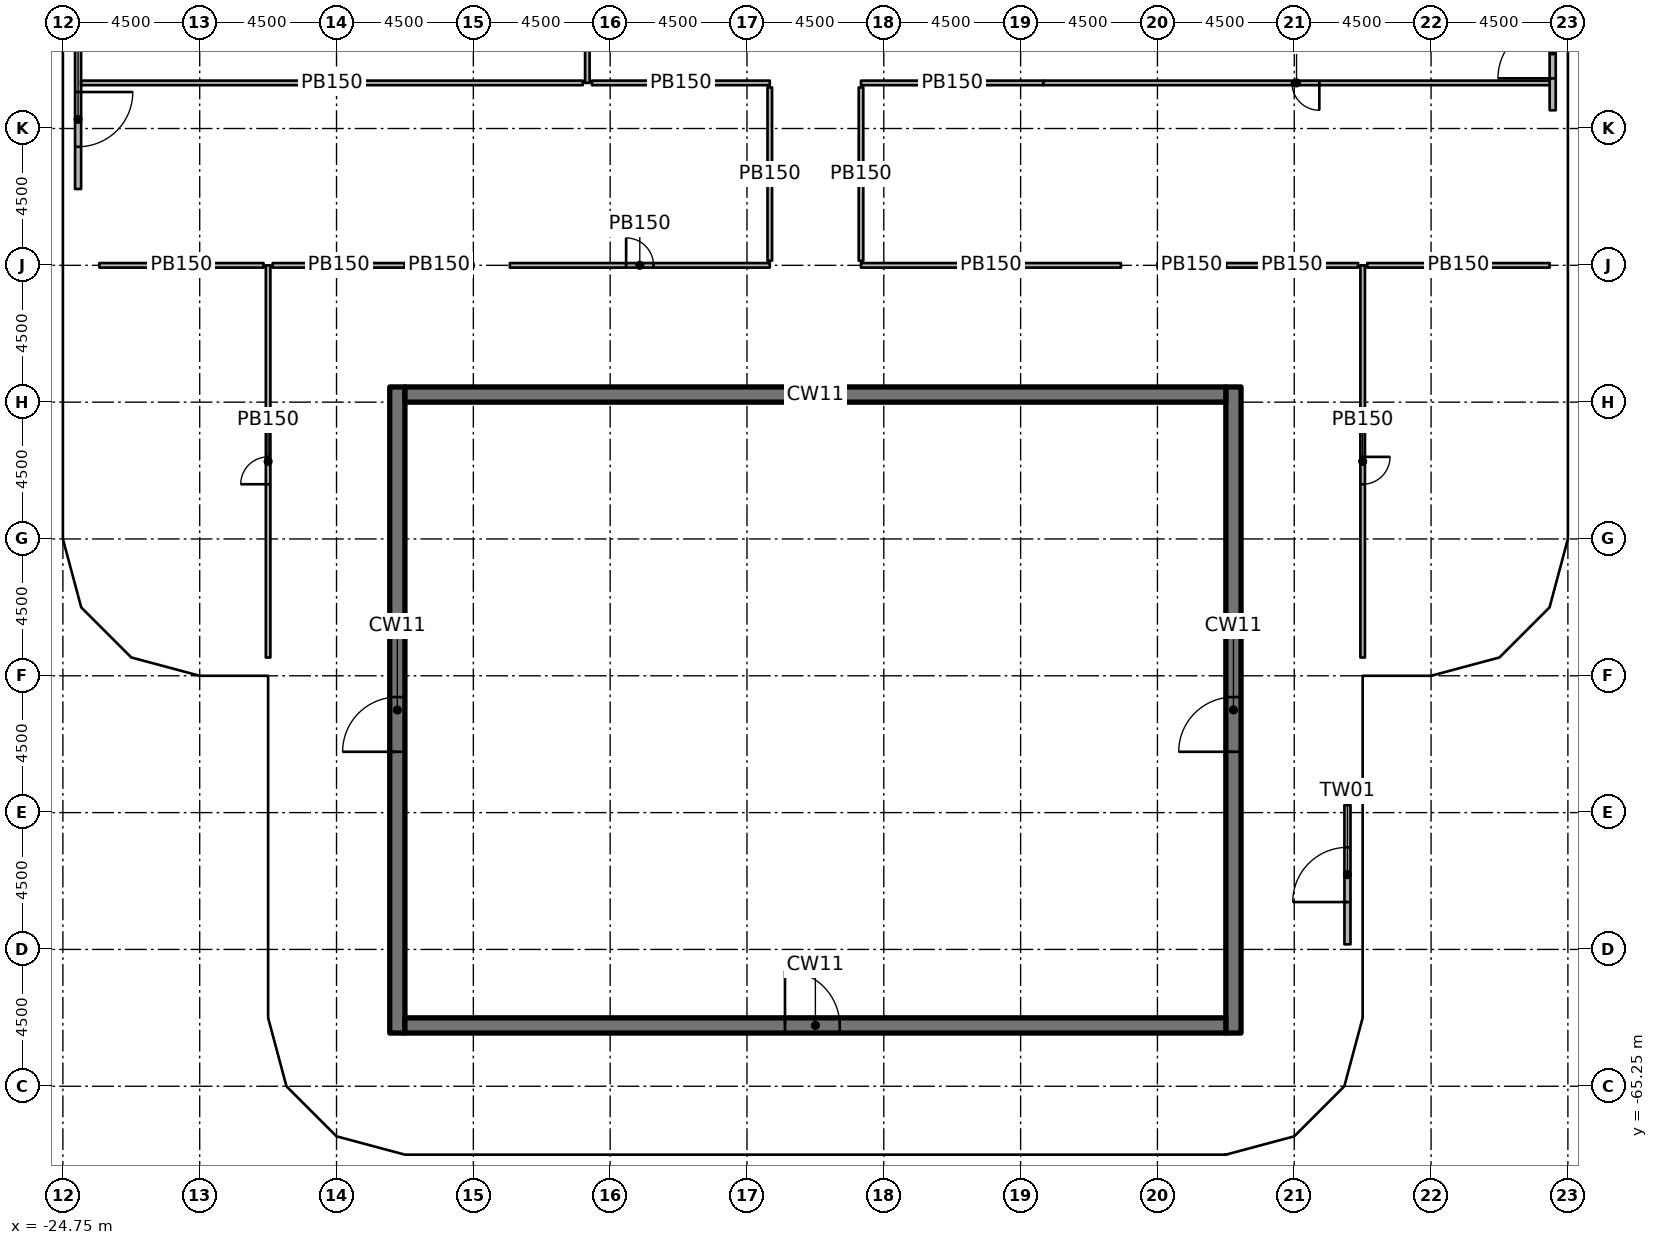
"""IFC4 building model, lengths in metres.
Left out: names, types, materials, properties, quantities, classifications, styles, units other than length and angle.
Written with IfcOpenShell. Run it as: python <this file> out.ifc"""

import sys

from ifc_helpers import new_model, si_unit, direction, frame, frame_2d, origin, origin_2d, place, context, subcontext, project, spatial, rectangle, extrude, element, fill, save


model = new_model("IFC4")
c1 = context("Model", 3, precision=1e-05, world=origin(), true_north=direction((0.0, 1.0)))
c2 = subcontext(c1, "Body", "Model", "MODEL_VIEW")
j1 = project(units=[si_unit("LENGTHUNIT", "METRE"), si_unit("PLANEANGLEUNIT", "RADIAN")], contexts=[c1])
p1 = place(None, origin())
s1 = spatial("IfcSite", under=j1, at=p1, CompositionType="ELEMENT")
p2 = place(p1, origin())
s2 = spatial("IfcBuilding", under=s1, at=p2, CompositionType="ELEMENT")
p3 = place(p2, frame((0.0, 0.0, 7.0)))
s3 = spatial("IfcBuildingStorey", under=s2, at=p3, CompositionType="ELEMENT", Elevation=7.0)
for number, where, z_axis, x_axis in (
    (1, (-24.15, -38.25, 0.0), (0.0, 0.0, 1.0), (1.0, 0.0, 0.0)),
    (2, (-19.65, -42.75, 0.0), (0.0, 0.0, 1.0), (1.0, 0.0, 0.0)),
    (3, (-15.75, -60.75, 0.0), (0.0, 0.0, 1.0), (1.0, 0.0, 0.0)),
    (4, (-15.75, -56.25, 0.0), (0.0, 0.0, 1.0), (1.0, 0.0, 0.0)),
    (5, (-15.75, -51.75, 0.0), (0.0, 0.0, 1.0), (1.0, 0.0, 0.0)),
    (6, (-15.75, -47.25, 0.0), (0.0, 0.0, 1.0), (1.0, 0.0, 0.0)),
    (7, (-15.75, -42.75, 0.0), (0.0, 0.0, 1.0), (1.0, 0.0, 0.0)),
    (8, (-15.367, -39.68, 0.0), (0.0, 0.0, 1.0), (1.0, 0.0, 0.0)),
    (9, (-15.15, -33.75, 0.0), (0.0, 0.0, 1.0), (1.0, 0.0, 0.0)),
    (10, (-11.25, -65.25, 0.0), (0.0, 0.0, 1.0), (1.0, 0.0, 0.0)),
    (11, (-10.65, -38.85, 0.0), (0.0, 0.0, 1.0), (1.0, 0.0, 0.0)),
    (12, (-6.75, -65.25, 0.0), (0.0, 0.0, 1.0), (1.0, 0.0, 0.0)),
    (13, (-2.25, -65.25, 0.0), (0.0, 0.0, 1.0), (1.0, 0.0, 0.0)),
    (14, (-2.25, -33.11, 0.0), (0.0, 0.0, 1.0), (1.0, 0.0, 0.0)),
    (15, (2.25, -65.25, 0.0), (0.0, 0.0, 1.0), (1.0, 0.0, 0.0)),
    (16, (2.25, -33.11, 0.0), (0.0, 0.0, 1.0), (1.0, 0.0, 0.0)),
    (17, (6.75, -65.25, 0.0), (0.0, 0.0, 1.0), (1.0, 0.0, 0.0)),
    (18, (11.25, -65.25, 0.0), (0.0, 0.0, 1.0), (1.0, 0.0, 0.0)),
    (19, (10.65, -38.85, 0.0), (0.0, 0.0, 1.0), (1.0, 0.0, 0.0)),
    (20, (10.65, -33.75, 0.0), (0.0, 0.0, 1.0), (1.0, 0.0, 0.0)),
    (21, (15.75, -60.75, 0.0), (0.0, 0.0, 1.0), (1.0, 0.0, 0.0)),
    (22, (15.75, -56.25, 0.0), (0.0, 0.0, 1.0), (1.0, 0.0, 0.0)),
    (23, (15.75, -51.75, 0.0), (0.0, 0.0, 1.0), (1.0, 0.0, 0.0)),
    (24, (15.75, -47.25, 0.0), (0.0, 0.0, 1.0), (1.0, 0.0, 0.0)),
    (25, (15.75, -42.75, 0.0), (0.0, 0.0, 1.0), (1.0, 0.0, 0.0)),
    (26, (15.367, -39.68, 0.0), (0.0, 0.0, 1.0), (1.0, 0.0, 0.0)),
    (27, (19.65, -42.75, 0.0), (0.0, 0.0, 1.0), (1.0, 0.0, 0.0)),
    (28, (23.97, -47.25, 0.0), (0.0, 0.0, 1.0), (1.0, 0.0, 0.0)),
    (29, (24.15, -33.75, 0.0), (0.0, 0.0, 1.0), (1.0, 0.0, 0.0)),
):
    element("IfcColumn", number, at=place(p3, frame(where, z_axis=z_axis, x_axis=x_axis)), inside=s3, PredefinedType="COLUMN", context=c2, shape_type="SweptSolid", body=[
        extrude(rectangle(XDim=1.2, YDim=1.2, at=origin_2d()), origin(), (0.0, 0.0, 1.0), 4.55),
    ])
p4 = place(p3, frame((-13.75, -63.5, 0.0), z_axis=(0.0, 0.0, 1.0), x_axis=(0.0, 1.0, 0.0)))
e30 = element("IfcWall", 30, at=p4, inside=s3, PredefinedType="SOLIDWALL", context=c2, shape_type="SweptSolid", body=[
    extrude(rectangle(XDim=21.25, YDim=0.5, at=frame_2d((10.625, 0.0))), origin(), (0.0, 0.0, 1.0), 5.0),
])
p5 = place(p4, frame((9.25, 0.0, 0.0)))
e31 = element("IfcOpeningElement", 31, at=p5, cuts=e30, PredefinedType="OPENING", context=c2, shape_type="SweptSolid", body=[
    extrude(rectangle(XDim=1.8, YDim=2.1, at=frame_2d((0.9, 1.05))), frame((0.0, 0.26, 0.0), z_axis=(0.0, -1.0, 0.0), x_axis=(1.0, 0.0, 0.0)), (0.0, 0.0, 1.0), 0.52),
])
p6 = place(p3, frame((13.75, -63.5, 0.0), z_axis=(0.0, 0.0, 1.0), x_axis=(0.0, 1.0, 0.0)))
e32 = element("IfcWall", 32, at=p6, inside=s3, PredefinedType="SOLIDWALL", context=c2, shape_type="SweptSolid", body=[
    extrude(rectangle(XDim=21.25, YDim=0.5, at=frame_2d((10.625, 0.0))), origin(), (0.0, 0.0, 1.0), 5.0),
])
p7 = place(p6, frame((9.25, 0.0, 0.0)))
e33 = element("IfcOpeningElement", 33, at=p7, cuts=e32, PredefinedType="OPENING", context=c2, shape_type="SweptSolid", body=[
    extrude(rectangle(XDim=1.8, YDim=2.1, at=frame_2d((0.9, 1.05))), frame((0.0, 0.26, 0.0), z_axis=(0.0, -1.0, 0.0), x_axis=(1.0, 0.0, 0.0)), (0.0, 0.0, 1.0), 0.52),
])
p8 = place(p3, frame((-13.5, -63.25, 0.0), z_axis=(0.0, 0.0, 1.0), x_axis=(1.0, 0.0, 0.0)))
e34 = element("IfcWall", 34, at=p8, inside=s3, PredefinedType="SOLIDWALL", context=c2, shape_type="SweptSolid", body=[
    extrude(rectangle(XDim=27.0, YDim=0.5, at=frame_2d((13.5, 0.0))), origin(), (0.0, 0.0, 1.0), 5.0),
])
p9 = place(p8, frame((12.5, 0.0, 0.0)))
e35 = element("IfcOpeningElement", 35, at=p9, cuts=e34, PredefinedType="OPENING", context=c2, shape_type="SweptSolid", body=[
    extrude(rectangle(XDim=1.8, YDim=2.1, at=frame_2d((0.9, 1.05))), frame((0.0, 0.26, 0.0), z_axis=(0.0, -1.0, 0.0), x_axis=(1.0, 0.0, 0.0)), (0.0, 0.0, 1.0), 0.52),
])
p10 = place(p3, frame((-13.5, -42.5, 0.0), z_axis=(0.0, 0.0, 1.0), x_axis=(1.0, 0.0, 0.0)))
e36 = element("IfcWall", 36, at=p10, inside=s3, PredefinedType="SOLIDWALL", context=c2, shape_type="SweptSolid", body=[
    extrude(rectangle(XDim=27.0, YDim=0.5, at=frame_2d((13.5, 0.0))), origin(), (0.0, 0.0, 1.0), 5.0),
])
p11 = place(p3, frame((17.5, -60.582, 0.0), z_axis=(0.0, 0.0, 1.0), x_axis=(0.0, 1.0, 0.0)))
e37 = element("IfcWall", 37, at=p11, inside=s3, PredefinedType="SOLIDWALL", context=c2, shape_type="SweptSolid", body=[
    extrude(rectangle(XDim=4.58, YDim=0.2, at=frame_2d((2.29, 0.0))), origin(), (0.0, 0.0, 1.0), 4.55),
])
p12 = place(p11, frame((1.39, 0.0, 0.0)))
e38 = element("IfcOpeningElement", 38, at=p12, cuts=e37, PredefinedType="OPENING", context=c2, shape_type="SweptSolid", body=[
    extrude(rectangle(XDim=1.8, YDim=2.4, at=frame_2d((0.9, 1.2))), frame((0.0, 0.11, 0.0), z_axis=(0.0, -1.0, 0.0), x_axis=(1.0, 0.0, 0.0)), (0.0, 0.0, 1.0), 0.22),
])
p13 = place(p3, frame((24.25, -33.15, 0.0), z_axis=(0.0, 0.0, 1.0), x_axis=(0.0, 1.0, 0.0)))
e39 = element("IfcWall", 39, at=p13, inside=s3, PredefinedType="SOLIDWALL", context=c2, shape_type="SweptSolid", body=[
    extrude(rectangle(XDim=3.9, YDim=0.2, at=frame_2d((1.95, 0.0))), origin(), (0.0, 0.0, 1.0), 4.55),
])
p14 = place(p13, frame((1.05, 0.0, 0.0)))
e40 = element("IfcOpeningElement", 40, at=p14, cuts=e39, PredefinedType="OPENING", context=c2, shape_type="SweptSolid", body=[
    extrude(rectangle(XDim=1.8, YDim=2.4, at=frame_2d((0.9, 1.2))), frame((0.0, 0.11, 0.0), z_axis=(0.0, -1.0, 0.0), x_axis=(1.0, 0.0, 0.0)), (0.0, 0.0, 1.0), 0.22),
])
p15 = place(p3, frame((-24.25, -31.16, 0.0), z_axis=(0.0, 0.0, 1.0), x_axis=(0.0, -1.0, 0.0)))
e41 = element("IfcWall", 41, at=p15, inside=s3, PredefinedType="SOLIDWALL", context=c2, shape_type="SweptSolid", body=[
    extrude(rectangle(XDim=4.58, YDim=0.2, at=frame_2d((2.29, 0.0))), origin(), (0.0, 0.0, 1.0), 4.55),
])
p16 = place(p15, frame((1.39, 0.0, 0.0)))
e42 = element("IfcOpeningElement", 42, at=p16, cuts=e41, PredefinedType="OPENING", context=c2, shape_type="SweptSolid", body=[
    extrude(rectangle(XDim=1.8, YDim=2.4, at=frame_2d((0.9, 1.2))), frame((0.0, 0.11, 0.0), z_axis=(0.0, -1.0, 0.0), x_axis=(1.0, 0.0, 0.0)), (0.0, 0.0, 1.0), 0.22),
])
p17 = place(p3, frame((-18.0, -51.15, 0.0), z_axis=(0.0, 0.0, 1.0), x_axis=(0.0, 1.0, 0.0)))
e43 = element("IfcWall", 43, at=p17, inside=s3, PredefinedType="PARTITIONING", context=c2, shape_type="SweptSolid", body=[
    extrude(rectangle(XDim=12.9, YDim=0.15, at=frame_2d((6.45, 0.0))), origin(), (0.0, 0.0, 1.0), 4.55),
])
p18 = place(p17, frame((5.7, 0.0, 0.0)))
e44 = element("IfcOpeningElement", 44, at=p18, cuts=e43, PredefinedType="OPENING", context=c2, shape_type="SweptSolid", body=[
    extrude(rectangle(XDim=0.9, YDim=2.1, at=frame_2d((0.45, 1.05))), frame((0.0, 0.085, 0.0), z_axis=(0.0, -1.0, 0.0), x_axis=(1.0, 0.0, 0.0)), (0.0, 0.0, 1.0), 0.17),
])
p19 = place(p3, frame((18.0, -38.25, 0.0), z_axis=(0.0, 0.0, 1.0), x_axis=(0.0, -1.0, 0.0)))
e45 = element("IfcWall", 45, at=p19, inside=s3, PredefinedType="PARTITIONING", context=c2, shape_type="SweptSolid", body=[
    extrude(rectangle(XDim=12.9, YDim=0.15, at=frame_2d((6.45, 0.0))), origin(), (0.0, 0.0, 1.0), 4.55),
])
p20 = place(p19, frame((6.3, 0.0, 0.0)))
e46 = element("IfcOpeningElement", 46, at=p20, cuts=e45, PredefinedType="OPENING", context=c2, shape_type="SweptSolid", body=[
    extrude(rectangle(XDim=0.9, YDim=2.1, at=frame_2d((0.45, 1.05))), frame((0.0, 0.085, 0.0), z_axis=(0.0, -1.0, 0.0), x_axis=(1.0, 0.0, 0.0)), (0.0, 0.0, 1.0), 0.17),
])
for number, where, z_axis, x_axis in (
    (47, (13.5, -38.25, 0.0), (0.0, 0.0, 1.0), (1.0, 0.0, 0.0)),
    (48, (-17.85, -38.25, 0.0), (0.0, 0.0, 1.0), (1.0, 0.0, 0.0)),
):
    element("IfcWall", number, at=place(p3, frame(where, z_axis=z_axis, x_axis=x_axis)), inside=s3, PredefinedType="PARTITIONING", context=c2, shape_type="SweptSolid", body=[
        extrude(rectangle(XDim=4.35, YDim=0.15, at=frame_2d((2.175, 0.0))), origin(), (0.0, 0.0, 1.0), 4.55),
    ])
p21 = place(p3, frame((1.5, -38.25, 0.0), z_axis=(0.0, 0.0, 1.0), x_axis=(1.0, 0.0, 0.0)))
e49 = element("IfcWall", 49, at=p21, inside=s3, PredefinedType="PARTITIONING", context=c2, shape_type="SweptSolid", body=[
    extrude(rectangle(XDim=8.55, YDim=0.15, at=frame_2d((4.275, 0.0))), origin(), (0.0, 0.0, 1.0), 4.55),
])
for number, where, z_axis, x_axis in (
    (50, (11.25, -38.25, 0.0), (0.0, 0.0, 1.0), (1.0, 0.0, 0.0)),
    (51, (-13.5, -38.25, 0.0), (0.0, 0.0, 1.0), (1.0, 0.0, 0.0)),
):
    element("IfcWall", number, at=place(p3, frame(where, z_axis=z_axis, x_axis=x_axis)), inside=s3, PredefinedType="PARTITIONING", context=c2, shape_type="SweptSolid", body=[
        extrude(rectangle(XDim=2.25, YDim=0.15, at=frame_2d((1.125, 0.0))), origin(), (0.0, 0.0, 1.0), 4.55),
    ])
p22 = place(p3, frame((-10.05, -38.25, 0.0), z_axis=(0.0, 0.0, 1.0), x_axis=(1.0, 0.0, 0.0)))
e52 = element("IfcWall", 52, at=p22, inside=s3, PredefinedType="PARTITIONING", context=c2, shape_type="SweptSolid", body=[
    extrude(rectangle(XDim=8.55, YDim=0.15, at=frame_2d((4.275, 0.0))), origin(), (0.0, 0.0, 1.0), 4.55),
])
p23 = place(p22, frame((3.825, 0.0, 0.0)))
e53 = element("IfcOpeningElement", 53, at=p23, cuts=e52, PredefinedType="OPENING", context=c2, shape_type="SweptSolid", body=[
    extrude(rectangle(XDim=0.9, YDim=2.1, at=frame_2d((0.45, 1.05))), frame((0.0, 0.085, 0.0), z_axis=(0.0, -1.0, 0.0), x_axis=(1.0, 0.0, 0.0)), (0.0, 0.0, 1.0), 0.17),
])
p24 = place(p3, frame((-23.55, -38.25, 0.0), z_axis=(0.0, 0.0, 1.0), x_axis=(1.0, 0.0, 0.0)))
e54 = element("IfcWall", 54, at=p24, inside=s3, PredefinedType="PARTITIONING", context=c2, shape_type="SweptSolid", body=[
    extrude(rectangle(XDim=5.4, YDim=0.15, at=frame_2d((2.7, 0.0))), origin(), (0.0, 0.0, 1.0), 4.55),
])
for number, where, z_axis, x_axis in (
    (55, (18.15, -38.25, 0.0), (0.0, 0.0, 1.0), (1.0, 0.0, 0.0)),
    (56, (7.5, -32.25, 0.0), (0.0, 0.0, 1.0), (-1.0, 0.0, 0.0)),
):
    element("IfcWall", number, at=place(p3, frame(where, z_axis=z_axis, x_axis=x_axis)), inside=s3, PredefinedType="PARTITIONING", context=c2, shape_type="SweptSolid", body=[
        extrude(rectangle(XDim=6.0, YDim=0.15, at=frame_2d((3.0, 0.0))), origin(), (0.0, 0.0, 1.0), 4.55),
    ])
p25 = place(p3, frame((-7.5, -32.25, 0.0), z_axis=(0.0, 0.0, 1.0), x_axis=(0.0, 1.0, 0.0)))
e57 = element("IfcWall", 57, at=p25, inside=s3, PredefinedType="PARTITIONING", context=c2, shape_type="SweptSolid", body=[
    extrude(rectangle(XDim=24.0, YDim=0.15, at=frame_2d((12.0, 0.0))), origin(), (0.0, 0.0, 1.0), 4.55),
])
p26 = place(p25, frame((12.75, 0.0, 0.0)))
e58 = element("IfcOpeningElement", 58, at=p26, cuts=e57, PredefinedType="OPENING", context=c2, shape_type="SweptSolid", body=[
    extrude(rectangle(XDim=0.9, YDim=2.1, at=frame_2d((0.45, 1.05))), frame((0.0, 0.085, 0.0), z_axis=(0.0, -1.0, 0.0), x_axis=(1.0, 0.0, 0.0)), (0.0, 0.0, 1.0), 0.17),
])
p27 = place(p3, frame((-1.5, -32.25, 0.0), z_axis=(0.0, 0.0, 1.0), x_axis=(-1.0, 0.0, 0.0)))
e59 = element("IfcWall", 59, at=p27, inside=s3, PredefinedType="PARTITIONING", context=c2, shape_type="SweptSolid", body=[
    extrude(rectangle(XDim=5.85, YDim=0.15, at=frame_2d((2.925, 0.0))), origin(), (0.0, 0.0, 1.0), 4.55),
])
for number, where, z_axis, x_axis in (
    (60, (1.5, -32.4, 0.0), (0.0, 0.0, 1.0), (0.0, -1.0, 0.0)),
    (61, (-1.5, -38.1, 0.0), (0.0, 0.0, 1.0), (0.0, 1.0, 0.0)),
):
    element("IfcWall", number, at=place(p3, frame(where, z_axis=z_axis, x_axis=x_axis)), inside=s3, PredefinedType="PARTITIONING", context=c2, shape_type="SweptSolid", body=[
        extrude(rectangle(XDim=5.7, YDim=0.15, at=frame_2d((2.85, 0.0))), origin(), (0.0, 0.0, 1.0), 4.55),
    ])
p28 = place(p3, frame((24.15, -32.25, 0.0), z_axis=(0.0, 0.0, 1.0), x_axis=(-1.0, 0.0, 0.0)))
e62 = element("IfcWall", 62, at=p28, inside=s3, PredefinedType="PARTITIONING", context=c2, shape_type="SweptSolid", body=[
    extrude(rectangle(XDim=16.65, YDim=0.15, at=frame_2d((8.325, 0.0))), origin(), (0.0, 0.0, 1.0), 4.55),
])
p29 = place(p28, frame((7.575, 0.0, 0.0)))
e63 = element("IfcOpeningElement", 63, at=p29, cuts=e62, PredefinedType="OPENING", context=c2, shape_type="SweptSolid", body=[
    extrude(rectangle(XDim=0.9, YDim=2.1, at=frame_2d((0.45, 1.05))), frame((0.0, 0.085, 0.0), z_axis=(0.0, -1.0, 0.0), x_axis=(1.0, 0.0, 0.0)), (0.0, 0.0, 1.0), 0.17),
])
p30 = place(p3, frame((-7.65, -32.25, 0.0), z_axis=(0.0, 0.0, 1.0), x_axis=(-1.0, 0.0, 0.0)))
e64 = element("IfcWall", 64, at=p30, inside=s3, PredefinedType="PARTITIONING", context=c2, shape_type="SweptSolid", body=[
    extrude(rectangle(XDim=16.5, YDim=0.15, at=frame_2d((8.25, 0.0))), origin(), (0.0, 0.0, 1.0), 4.55),
])
p31 = place(p12, origin())
e65 = element("IfcDoor", 65, at=p31, inside=s3, OperationType="SINGLE_SWING_LEFT", PredefinedType="DOOR", context=c2, shape_type="SweptSolid", body=[
    extrude(rectangle(XDim=1.8, YDim=2.4, at=frame_2d((0.9, 1.2))), frame((0.0, 0.025, 0.0), z_axis=(0.0, -1.0, 0.0), x_axis=(1.0, 0.0, 0.0)), (0.0, 0.0, 1.0), 0.05),
])
fill(e38, e65)
p32 = place(p14, origin())
e66 = element("IfcDoor", 66, at=p32, inside=s3, OperationType="SINGLE_SWING_LEFT", PredefinedType="DOOR", context=c2, shape_type="SweptSolid", body=[
    extrude(rectangle(XDim=1.8, YDim=2.4, at=frame_2d((0.9, 1.2))), frame((0.0, 0.025, 0.0), z_axis=(0.0, -1.0, 0.0), x_axis=(1.0, 0.0, 0.0)), (0.0, 0.0, 1.0), 0.05),
])
fill(e40, e66)
p33 = place(p16, origin())
e67 = element("IfcDoor", 67, at=p33, inside=s3, OperationType="SINGLE_SWING_LEFT", PredefinedType="DOOR", context=c2, shape_type="SweptSolid", body=[
    extrude(rectangle(XDim=1.8, YDim=2.4, at=frame_2d((0.9, 1.2))), frame((0.0, 0.025, 0.0), z_axis=(0.0, -1.0, 0.0), x_axis=(1.0, 0.0, 0.0)), (0.0, 0.0, 1.0), 0.05),
])
fill(e42, e67)
p34 = place(p18, origin())
e68 = element("IfcDoor", 68, at=p34, inside=s3, OperationType="SINGLE_SWING_LEFT", PredefinedType="DOOR", context=c2, shape_type="SweptSolid", body=[
    extrude(rectangle(XDim=0.9, YDim=2.1, at=frame_2d((0.45, 1.05))), frame((0.0, 0.025, 0.0), z_axis=(0.0, -1.0, 0.0), x_axis=(1.0, 0.0, 0.0)), (0.0, 0.0, 1.0), 0.05),
])
fill(e44, e68)
p35 = place(p20, origin())
e69 = element("IfcDoor", 69, at=p35, inside=s3, OperationType="SINGLE_SWING_LEFT", PredefinedType="DOOR", context=c2, shape_type="SweptSolid", body=[
    extrude(rectangle(XDim=0.9, YDim=2.1, at=frame_2d((0.45, 1.05))), frame((0.0, 0.025, 0.0), z_axis=(0.0, -1.0, 0.0), x_axis=(1.0, 0.0, 0.0)), (0.0, 0.0, 1.0), 0.05),
])
fill(e46, e69)
p36 = place(p23, origin())
e70 = element("IfcDoor", 70, at=p36, inside=s3, OperationType="SINGLE_SWING_LEFT", PredefinedType="DOOR", context=c2, shape_type="SweptSolid", body=[
    extrude(rectangle(XDim=0.9, YDim=2.1, at=frame_2d((0.45, 1.05))), frame((0.0, 0.025, 0.0), z_axis=(0.0, -1.0, 0.0), x_axis=(1.0, 0.0, 0.0)), (0.0, 0.0, 1.0), 0.05),
])
fill(e53, e70)
p37 = place(p29, origin())
e71 = element("IfcDoor", 71, at=p37, inside=s3, OperationType="SINGLE_SWING_LEFT", PredefinedType="DOOR", context=c2, shape_type="SweptSolid", body=[
    extrude(rectangle(XDim=0.9, YDim=2.1, at=frame_2d((0.45, 1.05))), frame((0.0, 0.025, 0.0), z_axis=(0.0, -1.0, 0.0), x_axis=(1.0, 0.0, 0.0)), (0.0, 0.0, 1.0), 0.05),
])
fill(e63, e71)
p38 = place(p5, origin())
e72 = element("IfcDoor", 72, at=p38, inside=s3, OperationType="DOUBLE_DOOR_DOUBLE_SWING", PredefinedType="DOOR", context=c2, shape_type="SweptSolid", body=[
    extrude(rectangle(XDim=1.8, YDim=2.1, at=frame_2d((0.9, 1.05))), frame((0.0, 0.025, 0.0), z_axis=(0.0, -1.0, 0.0), x_axis=(1.0, 0.0, 0.0)), (0.0, 0.0, 1.0), 0.05),
])
fill(e31, e72)
p39 = place(p7, origin())
e73 = element("IfcDoor", 73, at=p39, inside=s3, OperationType="DOUBLE_DOOR_DOUBLE_SWING", PredefinedType="DOOR", context=c2, shape_type="SweptSolid", body=[
    extrude(rectangle(XDim=1.8, YDim=2.1, at=frame_2d((0.9, 1.05))), frame((0.0, 0.025, 0.0), z_axis=(0.0, -1.0, 0.0), x_axis=(1.0, 0.0, 0.0)), (0.0, 0.0, 1.0), 0.05),
])
fill(e33, e73)
p40 = place(p9, origin())
e74 = element("IfcDoor", 74, at=p40, inside=s3, OperationType="DOUBLE_DOOR_DOUBLE_SWING", PredefinedType="DOOR", context=c2, shape_type="SweptSolid", body=[
    extrude(rectangle(XDim=1.8, YDim=2.1, at=frame_2d((0.9, 1.05))), frame((0.0, 0.025, 0.0), z_axis=(0.0, -1.0, 0.0), x_axis=(1.0, 0.0, 0.0)), (0.0, 0.0, 1.0), 0.05),
])
fill(e35, e74)
save(model, sys.argv[1])
